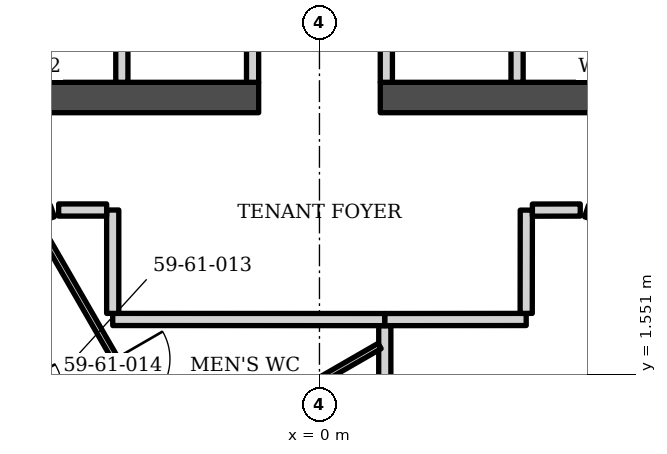
"""IFC4 building model, lengths in metres.
Left out: names, types, materials, properties, quantities, classifications, styles, units other than length and angle.
Written with IfcOpenShell. Run it as: python <this file> out.ifc"""

import sys

from ifc_helpers import new_model, si_unit, direction, frame, frame_2d, origin, place, context, subcontext, project, spatial, rectangle, extrude, element, fill, save


model = new_model("IFC4")
c1 = context("Model", 3, precision=1e-05, world=origin(), true_north=direction((0.0, 1.0)))
c2 = subcontext(c1, "Body", "Model", "MODEL_VIEW")
j1 = project(units=[si_unit("LENGTHUNIT", "METRE"), si_unit("PLANEANGLEUNIT", "RADIAN")], contexts=[c1])
p1 = place(None, origin())
s1 = spatial("IfcSite", under=j1, at=p1, CompositionType="ELEMENT")
p2 = place(p1, origin())
s2 = spatial("IfcBuilding", under=s1, at=p2, CompositionType="ELEMENT")
p3 = place(p2, frame((0.0, 0.0, 248.2)))
s3 = spatial("IfcBuildingStorey", under=s2, at=p3, CompositionType="ELEMENT", Elevation=248.2)
p4 = place(p3, frame((-8.05, 6.103, 0.0), z_axis=(0.0, 0.0, 1.0), x_axis=(1.0, 0.0, 0.0)))
e1 = element("IfcWall", 1, at=p4, inside=s3, PredefinedType="SHEAR", context=c2, shape_type="SweptSolid", body=[
    extrude(rectangle(XDim=7.05, YDim=0.5, at=frame_2d((3.525, 0.0))), origin(), (0.0, 0.0, 1.0), 3.9),
])
p5 = place(p4, frame((0.825, 0.0, 0.0)))
e2 = element("IfcOpeningElement", 2, at=p5, cuts=e1, PredefinedType="OPENING", context=c2, shape_type="SweptSolid", body=[
    extrude(rectangle(XDim=0.9, YDim=2.1, at=frame_2d((0.45, 1.05))), frame((0.0, 0.26, 0.0), z_axis=(0.0, -1.0, 0.0), x_axis=(1.0, 0.0, 0.0)), (0.0, 0.0, 1.0), 0.52),
])
p6 = place(p3, frame((1.0, 6.103, 0.0), z_axis=(0.0, 0.0, 1.0), x_axis=(1.0, 0.0, 0.0)))
e3 = element("IfcWall", 3, at=p6, inside=s3, PredefinedType="SHEAR", context=c2, shape_type="SweptSolid", body=[
    extrude(rectangle(XDim=7.05, YDim=0.5, at=frame_2d((3.525, 0.0))), origin(), (0.0, 0.0, 1.0), 3.9),
])
p7 = place(p6, frame((5.325, 0.0, 0.0)))
e4 = element("IfcOpeningElement", 4, at=p7, cuts=e3, PredefinedType="OPENING", context=c2, shape_type="SweptSolid", body=[
    extrude(rectangle(XDim=0.9, YDim=2.1, at=frame_2d((0.45, 1.05))), frame((0.0, 0.26, 0.0), z_axis=(0.0, -1.0, 0.0), x_axis=(1.0, 0.0, 0.0)), (0.0, 0.0, 1.0), 0.52),
])
for number, where, z_axis, x_axis in (
    (5, (-3.25, 6.353, 0.0), (0.0, 0.0, 1.0), (0.0, 1.0, 0.0)),
    (6, (-1.1, 6.353, 0.0), (0.0, 0.0, 1.0), (0.0, 1.0, 0.0)),
    (7, (1.1, 6.353, 0.0), (0.0, 0.0, 1.0), (0.0, 1.0, 0.0)),
    (8, (3.25, 6.353, 0.0), (0.0, 0.0, 1.0), (0.0, 1.0, 0.0)),
):
    element("IfcWall", number, at=place(p3, frame(where, z_axis=z_axis, x_axis=x_axis)), inside=s3, PredefinedType="SOLIDWALL", context=c2, shape_type="SweptSolid", body=[
        extrude(rectangle(XDim=2.5, YDim=0.2, at=frame_2d((1.25, 0.0))), origin(), (0.0, 0.0, 1.0), 3.73),
    ])
p8 = place(p3, frame((0.217, -7.532, 0.0), z_axis=(0.0, 0.0, 1.0), x_axis=(0.499766665369, 0.866160077691, 0.0)))
e9 = element("IfcWall", 9, at=p8, inside=s3, PredefinedType="PARTITIONING", context=c2, shape_type="SweptSolid", body=[
    extrude(rectangle(XDim=12.588, YDim=0.2, at=frame_2d((6.294, 0.0))), origin(), (0.0, 0.0, 1.0), 2.884),
])
p9 = place(p8, frame((9.201, 0.0, 0.0)))
e10 = element("IfcOpeningElement", 10, at=p9, cuts=e9, PredefinedType="OPENING", context=c2, shape_type="SweptSolid", body=[
    extrude(rectangle(XDim=0.8, YDim=2.1, at=frame_2d((0.4, 1.05))), frame((0.0, 0.11, 0.0), z_axis=(0.0, -1.0, 0.0), x_axis=(1.0, 0.0, 0.0)), (0.0, 0.0, 1.0), 0.22),
])
p10 = place(p3, frame((1.074, -1.803, 0.0), z_axis=(0.0, 0.0, 1.0), x_axis=(0.0, 1.0, 0.0)))
e11 = element("IfcWall", 11, at=p10, inside=s3, PredefinedType="PARTITIONING", context=c2, shape_type="SweptSolid", body=[
    extrude(rectangle(XDim=4.154, YDim=0.2, at=frame_2d((2.077, 0.0))), origin(), (0.0, 0.0, 1.0), 3.73),
])
p11 = place(p3, frame((-2.32, 0.106, 0.0), z_axis=(0.0, 0.0, 1.0), x_axis=(0.866013238859, 0.500021069677, 0.0)))
e12 = element("IfcWall", 12, at=p11, inside=s3, PredefinedType="PARTITIONING", context=c2, shape_type="SweptSolid", body=[
    extrude(rectangle(XDim=3.822, YDim=0.1, at=frame_2d((1.911, 0.0))), origin(), (0.0, 0.0, 1.0), 2.884),
])
p12 = place(p3, frame((-3.4, 2.452, 0.0), z_axis=(0.0, 0.0, 1.0), x_axis=(0.999999927065, -0.000381929261, 0.0)))
e13 = element("IfcWall", 13, at=p12, inside=s3, PredefinedType="PARTITIONING", context=c2, shape_type="SweptSolid", body=[
    extrude(rectangle(XDim=4.475, YDim=0.2, at=frame_2d((2.237, 0.0))), origin(), (0.0, 0.0, 1.0), 3.73),
])
p13 = place(p3, frame((1.076, 2.451, 0.0), z_axis=(0.0, 0.0, 1.0), x_axis=(0.999999729558, 0.000735448425, 0.0)))
e14 = element("IfcWall", 14, at=p13, inside=s3, PredefinedType="PARTITIONING", context=c2, shape_type="SweptSolid", body=[
    extrude(rectangle(XDim=2.324, YDim=0.2, at=frame_2d((1.162, 0.0))), origin(), (0.0, 0.0, 1.0), 3.73),
])
p14 = place(p3, frame((-3.4, 4.252, 0.0), z_axis=(0.0, 0.0, 1.0), x_axis=(0.0, -1.0, 0.0)))
e15 = element("IfcWall", 15, at=p14, inside=s3, PredefinedType="PARTITIONING", context=c2, shape_type="SweptSolid", body=[
    extrude(rectangle(XDim=1.7, YDim=0.2, at=frame_2d((0.85, 0.0))), origin(), (0.0, 0.0, 1.0), 3.73),
])
p15 = place(p3, frame((-6.458, 3.37, 0.0), z_axis=(0.0, 0.0, 1.0), x_axis=(0.500262411632, -0.86587384734, 0.0)))
e16 = element("IfcWall", 16, at=p15, inside=s3, PredefinedType="PARTITIONING", context=c2, shape_type="SweptSolid", body=[
    extrude(rectangle(XDim=12.589, YDim=0.2, at=frame_2d((6.294, 0.0))), origin(), (0.0, 0.0, 1.0), 2.884),
])
p16 = place(p15, frame((8.832, 0.0, 0.0)))
e17 = element("IfcOpeningElement", 17, at=p16, cuts=e16, PredefinedType="OPENING", context=c2, shape_type="SweptSolid", body=[
    extrude(rectangle(XDim=0.9, YDim=2.1, at=frame_2d((0.45, 1.05))), frame((0.0, 0.11, 0.0), z_axis=(0.0, -1.0, 0.0), x_axis=(1.0, 0.0, 0.0)), (0.0, 0.0, 1.0), 0.22),
])
p17 = place(p15, frame((2.488, 0.0, 0.0)))
e18 = element("IfcOpeningElement", 18, at=p17, cuts=e16, PredefinedType="OPENING", context=c2, shape_type="SweptSolid", body=[
    extrude(rectangle(XDim=1.0, YDim=2.1, at=frame_2d((0.5, 1.05))), frame((0.0, 0.11, 0.0), z_axis=(0.0, -1.0, 0.0), x_axis=(1.0, 0.0, 0.0)), (0.0, 0.0, 1.0), 0.22),
])
p18 = place(p3, frame((4.393, 4.236, 0.0), z_axis=(0.0, 0.0, 1.0), x_axis=(0.948729076189, -0.316090398453, 0.0)))
e19 = element("IfcWall", 19, at=p18, inside=s3, PredefinedType="PARTITIONING", context=c2, shape_type="SweptSolid", body=[
    extrude(rectangle(XDim=1.6, YDim=0.2, at=frame_2d((0.8, 0.0))), origin(), (0.0, 0.0, 1.0), 2.884),
])
p19 = place(p3, frame((-4.702, 4.132, 0.0), z_axis=(0.0, 0.0, 1.0), x_axis=(0.499966025771, -0.866045017926, 0.0)))
e20 = element("IfcWall", 20, at=p19, inside=s3, PredefinedType="PARTITIONING", context=c2, shape_type="SweptSolid", body=[
    extrude(rectangle(XDim=6.854, YDim=0.1, at=frame_2d((3.427, 0.0))), origin(), (0.0, 0.0, 1.0), 2.884),
])
p20 = place(p19, frame((2.688, 0.0, 0.0)))
e21 = element("IfcOpeningElement", 21, at=p20, cuts=e20, PredefinedType="OPENING", context=c2, shape_type="SweptSolid", body=[
    extrude(rectangle(XDim=0.9, YDim=2.1, at=frame_2d((0.45, 1.05))), frame((0.0, 0.06, 0.0), z_axis=(0.0, -1.0, 0.0), x_axis=(1.0, 0.0, 0.0)), (0.0, 0.0, 1.0), 0.12),
])
p21 = place(p19, frame((5.216, 0.0, 0.0)))
e22 = element("IfcOpeningElement", 22, at=p21, cuts=e20, PredefinedType="OPENING", context=c2, shape_type="SweptSolid", body=[
    extrude(rectangle(XDim=0.9, YDim=2.1, at=frame_2d((0.45, 1.05))), frame((0.0, 0.06, 0.0), z_axis=(0.0, -1.0, 0.0), x_axis=(1.0, 0.0, 0.0)), (0.0, 0.0, 1.0), 0.12),
])
p22 = place(p3, frame((-4.656, 4.146, 0.0), z_axis=(0.0, 0.0, 1.0), x_axis=(0.947002540531, 0.321226070282, 0.0)))
e23 = element("IfcWall", 23, at=p22, inside=s3, PredefinedType="PARTITIONING", context=c2, shape_type="SweptSolid", body=[
    extrude(rectangle(XDim=0.278, YDim=0.2, at=frame_2d((0.139, 0.0))), origin(), (0.0, 0.0, 1.0), 2.884),
])
p23 = place(p3, frame((-4.289, 4.252, 0.0), z_axis=(0.0, 0.0, 1.0), x_axis=(1.0, 0.0, 0.0)))
e24 = element("IfcWall", 24, at=p23, inside=s3, PredefinedType="PARTITIONING", context=c2, shape_type="SweptSolid", body=[
    extrude(rectangle(XDim=0.789, YDim=0.2, at=frame_2d((0.395, 0.0))), origin(), (0.0, 0.0, 1.0), 3.73),
])
p24 = place(p3, frame((3.4, 2.552, 0.0), z_axis=(0.0, 0.0, 1.0), x_axis=(0.001150250857, 0.999999338461, 0.0)))
e25 = element("IfcWall", 25, at=p24, inside=s3, PredefinedType="PARTITIONING", context=c2, shape_type="SweptSolid", body=[
    extrude(rectangle(XDim=1.698, YDim=0.2, at=frame_2d((0.849, 0.0))), origin(), (0.0, 0.0, 1.0), 3.73),
])
p25 = place(p3, frame((3.502, 4.251, 0.0), z_axis=(0.0, 0.0, 1.0), x_axis=(0.999997642919, 0.002171210763, 0.0)))
e26 = element("IfcWall", 26, at=p25, inside=s3, PredefinedType="PARTITIONING", context=c2, shape_type="SweptSolid", body=[
    extrude(rectangle(XDim=0.787, YDim=0.2, at=frame_2d((0.394, 0.0))), origin(), (0.0, 0.0, 1.0), 3.73),
])
p26 = place(p20, origin())
e27 = element("IfcDoor", 27, at=p26, inside=s3, OperationType="SINGLE_SWING_LEFT", PredefinedType="DOOR", context=c2, shape_type="SweptSolid", body=[
    extrude(rectangle(XDim=0.9, YDim=2.1, at=frame_2d((0.45, 1.05))), frame((0.0, 0.025, 0.0), z_axis=(0.0, -1.0, 0.0), x_axis=(1.0, 0.0, 0.0)), (0.0, 0.0, 1.0), 0.05),
])
fill(e21, e27)
save(model, sys.argv[1])
